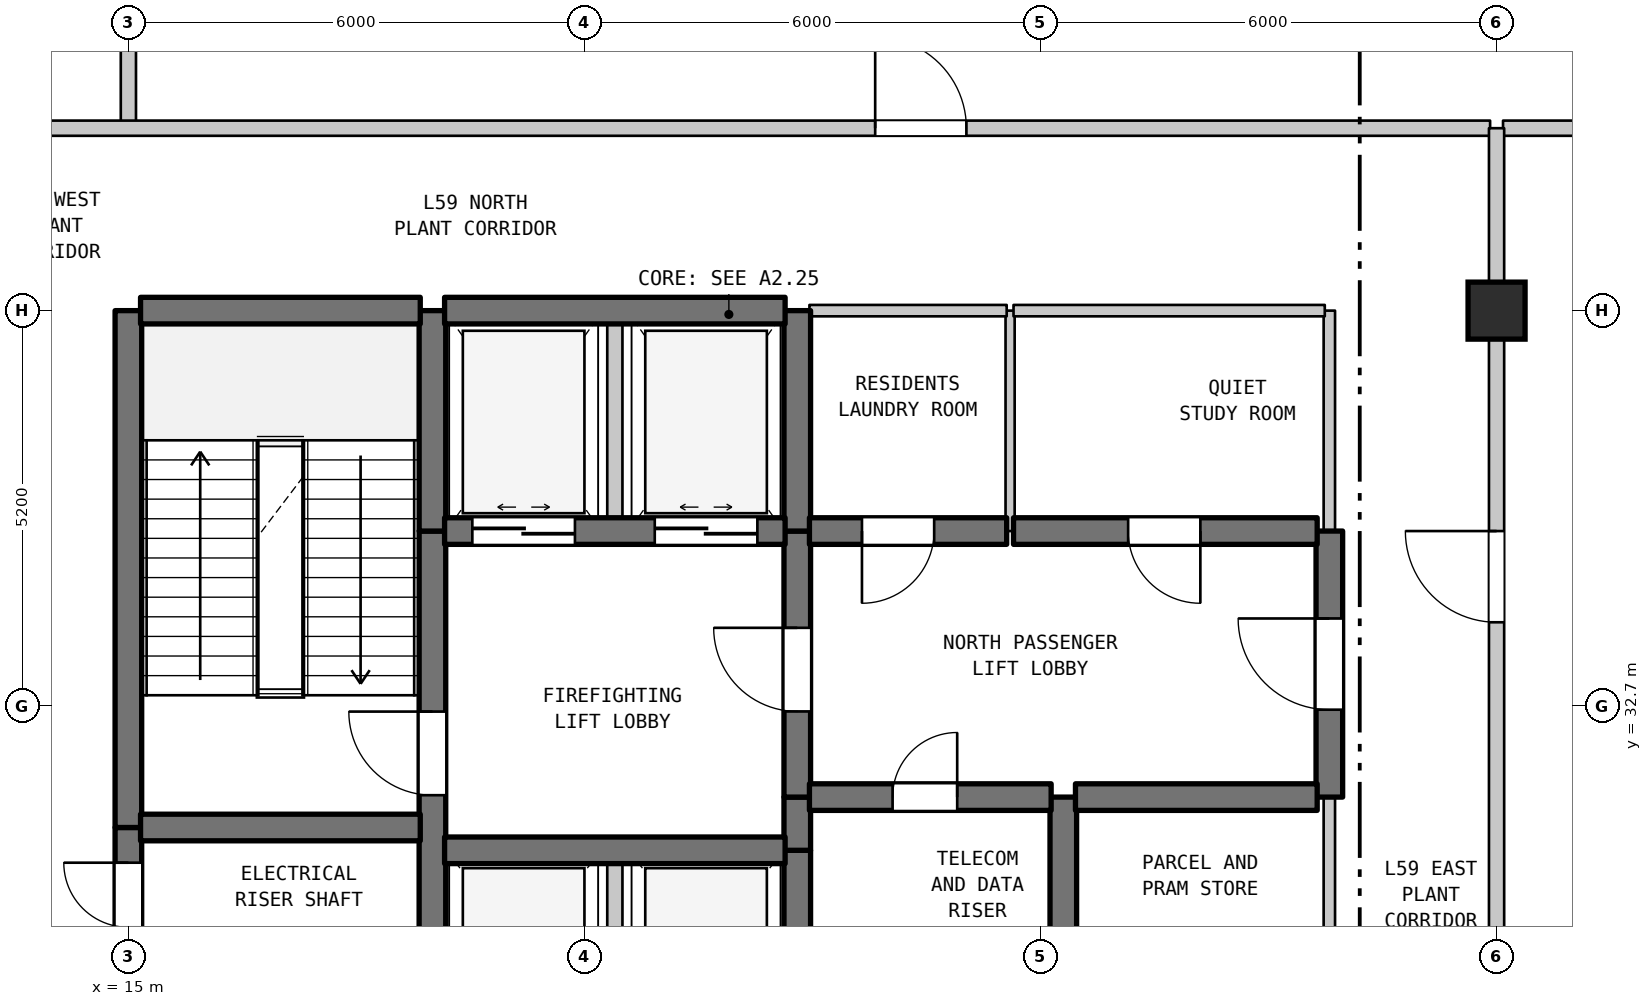
"""IFC4 building model, lengths in metres.
Left out: names, types, materials, properties, quantities, classifications, styles, units other than length and angle.
Written with IfcOpenShell. Run it as: python <this file> out.ifc"""

import sys

from ifc_helpers import new_model, si_unit, direction, frame, frame_2d, origin, origin_2d, place, context, subcontext, project, spatial, rectangle, extrude, element, fill, save


model = new_model("IFC4")
c1 = context("Model", 3, precision=1e-05, world=origin(), true_north=direction((0.0, 1.0)))
c2 = subcontext(c1, "Body", "Model", "MODEL_VIEW")
j1 = project(units=[si_unit("LENGTHUNIT", "METRE"), si_unit("PLANEANGLEUNIT", "RADIAN")], contexts=[c1])
p1 = place(None, origin())
s1 = spatial("IfcSite", under=j1, at=p1, CompositionType="ELEMENT")
p2 = place(p1, origin())
s2 = spatial("IfcBuilding", under=s1, at=p2, CompositionType="ELEMENT")
p3 = place(p2, frame((0.0, 0.0, 237.6)))
s3 = spatial("IfcBuildingStorey", under=s2, at=p3, CompositionType="ELEMENT", Elevation=237.6)
p4 = place(p3, frame((33.0, 37.9, 0.0), z_axis=(0.0, 0.0, 1.0), x_axis=(1.0, 0.0, 0.0)))
e1 = element("IfcColumn", 1, at=p4, inside=s3, PredefinedType="COLUMN", context=c2, shape_type="SweptSolid", body=[
    extrude(rectangle(XDim=0.75, YDim=0.75, at=origin_2d()), origin(), (0.0, 0.0, 1.0), 5.2),
])
p5 = place(p3, frame((3.497, 23.993, 0.0), z_axis=(0.0, 0.0, 1.0), x_axis=(0.358990281293, 0.93334129767, 0.0)))
e2 = element("IfcWall", 2, at=p5, inside=s3, PredefinedType="STANDARD", context=c2, shape_type="SweptSolid", body=[
    extrude(rectangle(XDim=30.669, YDim=0.26, at=frame_2d((15.335, 0.0))), origin(), (0.0, 0.0, 1.0), 4.88),
])
p6 = place(p3, frame((15.0, 29.5, 0.0), z_axis=(0.0, 0.0, 1.0), x_axis=(0.0, 1.0, 0.0)))
e3 = element("IfcWall", 3, at=p6, inside=s3, PredefinedType="SHEAR", context=c2, shape_type="SweptSolid", body=[
    extrude(rectangle(XDim=1.6, YDim=0.35, at=frame_2d((0.8, 0.0))), origin(), (0.0, 0.0, 1.0), 4.88),
])
p7 = place(p6, frame((0.287, 0.0, 0.0)))
e4 = element("IfcOpeningElement", 4, at=p7, cuts=e3, PredefinedType="OPENING", context=c2, shape_type="SweptSolid", body=[
    extrude(rectangle(XDim=0.85, YDim=2.1, at=frame_2d((0.425, 1.05))), frame((0.0, 0.185, 0.0), z_axis=(0.0, -1.0, 0.0), x_axis=(1.0, 0.0, 0.0)), (0.0, 0.0, 1.0), 0.37),
])
p8 = place(p3, frame((15.0, 31.1, 0.0), z_axis=(0.0, 0.0, 1.0), x_axis=(0.0, 1.0, 0.0)))
e5 = element("IfcWall", 5, at=p8, inside=s3, PredefinedType="SHEAR", context=c2, shape_type="SweptSolid", body=[
    extrude(rectangle(XDim=6.8, YDim=0.35, at=frame_2d((3.4, 0.0))), origin(), (0.0, 0.0, 1.0), 4.88),
])
p9 = place(p3, frame((15.0, 40.3, 0.0), z_axis=(0.0, 0.0, 1.0), x_axis=(0.0, 1.0, 0.0)))
e6 = element("IfcWall", 6, at=p9, inside=s3, PredefinedType="STANDARD", context=c2, shape_type="SweptSolid", body=[
    extrude(rectangle(XDim=12.933, YDim=0.2, at=frame_2d((6.466, 0.0))), origin(), (0.0, 0.0, 1.0), 4.88),
])
p10 = place(p3, frame((19.0, 29.5, 0.0), z_axis=(0.0, 0.0, 1.0), x_axis=(0.0, 1.0, 0.0)))
e7 = element("IfcWall", 7, at=p10, inside=s3, PredefinedType="SHEAR", context=c2, shape_type="SweptSolid", body=[
    extrude(rectangle(XDim=5.5, YDim=0.35, at=frame_2d((2.75, 0.0))), origin(), (0.0, 0.0, 1.0), 4.88),
])
p11 = place(p10, frame((2.025, 0.0, 0.0)))
e8 = element("IfcOpeningElement", 8, at=p11, cuts=e7, PredefinedType="OPENING", context=c2, shape_type="SweptSolid", body=[
    extrude(rectangle(XDim=1.1, YDim=2.15, at=frame_2d((0.55, 1.075))), frame((0.0, 0.185, 0.0), z_axis=(0.0, -1.0, 0.0), x_axis=(1.0, 0.0, 0.0)), (0.0, 0.0, 1.0), 0.37),
])
p12 = place(p3, frame((19.0, 35.0, 0.0), z_axis=(0.0, 0.0, 1.0), x_axis=(0.0, 1.0, 0.0)))
e9 = element("IfcWall", 9, at=p12, inside=s3, PredefinedType="SHEAR", context=c2, shape_type="SweptSolid", body=[
    extrude(rectangle(XDim=2.9, YDim=0.35, at=frame_2d((1.45, 0.0))), origin(), (0.0, 0.0, 1.0), 4.88),
])
p13 = place(p3, frame((21.4, 28.2, 0.0), z_axis=(0.0, 0.0, 1.0), x_axis=(0.0, 1.0, 0.0)))
e10 = element("IfcWall", 10, at=p13, inside=s3, PredefinedType="STANDARD", context=c2, shape_type="SweptSolid", body=[
    extrude(rectangle(XDim=2.6, YDim=0.2, at=frame_2d((1.3, 0.0))), origin(), (0.0, 0.0, 1.0), 4.88),
])
p14 = place(p3, frame((21.4, 35.0, 0.0), z_axis=(0.0, 0.0, 1.0), x_axis=(0.0, 1.0, 0.0)))
e11 = element("IfcWall", 11, at=p14, inside=s3, PredefinedType="STANDARD", context=c2, shape_type="SweptSolid", body=[
    extrude(rectangle(XDim=2.9, YDim=0.2, at=frame_2d((1.45, 0.0))), origin(), (0.0, 0.0, 1.0), 4.88),
])
p15 = place(p3, frame((23.8, 29.5, 0.0), z_axis=(0.0, 0.0, 1.0), x_axis=(0.0, 1.0, 0.0)))
e12 = element("IfcWall", 12, at=p15, inside=s3, PredefinedType="SHEAR", context=c2, shape_type="SweptSolid", body=[
    extrude(rectangle(XDim=1.3, YDim=0.35, at=frame_2d((0.65, 0.0))), origin(), (0.0, 0.0, 1.0), 4.88),
])
p16 = place(p3, frame((23.8, 30.8, 0.0), z_axis=(0.0, 0.0, 1.0), x_axis=(0.0, 1.0, 0.0)))
e13 = element("IfcWall", 13, at=p16, inside=s3, PredefinedType="SHEAR", context=c2, shape_type="SweptSolid", body=[
    extrude(rectangle(XDim=0.7, YDim=0.35, at=frame_2d((0.35, 0.0))), origin(), (0.0, 0.0, 1.0), 4.88),
])
p17 = place(p3, frame((23.8, 31.5, 0.0), z_axis=(0.0, 0.0, 1.0), x_axis=(0.0, 1.0, 0.0)))
e14 = element("IfcWall", 14, at=p17, inside=s3, PredefinedType="SHEAR", context=c2, shape_type="SweptSolid", body=[
    extrude(rectangle(XDim=3.5, YDim=0.35, at=frame_2d((1.75, 0.0))), origin(), (0.0, 0.0, 1.0), 4.88),
])
p18 = place(p17, frame((1.127, 0.0, 0.0)))
e15 = element("IfcOpeningElement", 15, at=p18, cuts=e14, PredefinedType="OPENING", context=c2, shape_type="SweptSolid", body=[
    extrude(rectangle(XDim=1.1, YDim=2.15, at=frame_2d((0.55, 1.075))), frame((0.0, 0.185, 0.0), z_axis=(0.0, -1.0, 0.0), x_axis=(1.0, 0.0, 0.0)), (0.0, 0.0, 1.0), 0.37),
])
p19 = place(p3, frame((23.8, 35.0, 0.0), z_axis=(0.0, 0.0, 1.0), x_axis=(0.0, 1.0, 0.0)))
e16 = element("IfcWall", 16, at=p19, inside=s3, PredefinedType="SHEAR", context=c2, shape_type="SweptSolid", body=[
    extrude(rectangle(XDim=2.9, YDim=0.35, at=frame_2d((1.45, 0.0))), origin(), (0.0, 0.0, 1.0), 4.88),
])
p20 = place(p3, frame((26.6, 35.0, 0.0), z_axis=(0.0, 0.0, 1.0), x_axis=(0.0, 1.0, 0.0)))
e17 = element("IfcWall", 17, at=p20, inside=s3, PredefinedType="PARTITIONING", context=c2, shape_type="SweptSolid", body=[
    extrude(rectangle(XDim=2.9, YDim=0.12, at=frame_2d((1.45, 0.0))), origin(), (0.0, 0.0, 1.0), 4.88),
])
p21 = place(p3, frame((27.3, 29.5, 0.0), z_axis=(0.0, 0.0, 1.0), x_axis=(0.0, 1.0, 0.0)))
e18 = element("IfcWall", 18, at=p21, inside=s3, PredefinedType="SHEAR", context=c2, shape_type="SweptSolid", body=[
    extrude(rectangle(XDim=2.0, YDim=0.35, at=frame_2d((1.0, 0.0))), origin(), (0.0, 0.0, 1.0), 4.88),
])
p22 = place(p3, frame((30.8, 28.9, 0.0), z_axis=(0.0, 0.0, 1.0), x_axis=(0.0, 1.0, 0.0)))
e19 = element("IfcWall", 19, at=p22, inside=s3, PredefinedType="STANDARD", context=c2, shape_type="SweptSolid", body=[
    extrude(rectangle(XDim=2.6, YDim=0.15, at=frame_2d((1.3, 0.0))), origin(), (0.0, 0.0, 1.0), 4.88),
])
p23 = place(p3, frame((30.8, 31.5, 0.0), z_axis=(0.0, 0.0, 1.0), x_axis=(0.0, 1.0, 0.0)))
e20 = element("IfcWall", 20, at=p23, inside=s3, PredefinedType="SHEAR", context=c2, shape_type="SweptSolid", body=[
    extrude(rectangle(XDim=3.5, YDim=0.35, at=frame_2d((1.75, 0.0))), origin(), (0.0, 0.0, 1.0), 4.88),
])
p24 = place(p23, frame((1.15, 0.0, 0.0)))
e21 = element("IfcOpeningElement", 21, at=p24, cuts=e20, PredefinedType="OPENING", context=c2, shape_type="SweptSolid", body=[
    extrude(rectangle(XDim=1.2, YDim=2.2, at=frame_2d((0.6, 1.1))), frame((0.0, 0.185, 0.0), z_axis=(0.0, -1.0, 0.0), x_axis=(1.0, 0.0, 0.0)), (0.0, 0.0, 1.0), 0.37),
])
p25 = place(p3, frame((30.8, 35.0, 0.0), z_axis=(0.0, 0.0, 1.0), x_axis=(0.0, 1.0, 0.0)))
e22 = element("IfcWall", 22, at=p25, inside=s3, PredefinedType="STANDARD", context=c2, shape_type="SweptSolid", body=[
    extrude(rectangle(XDim=2.9, YDim=0.15, at=frame_2d((1.45, 0.0))), origin(), (0.0, 0.0, 1.0), 4.88),
])
p26 = place(p3, frame((33.0, 28.5, 0.0), z_axis=(0.0, 0.0, 1.0), x_axis=(0.0, 1.0, 0.0)))
e23 = element("IfcWall", 23, at=p26, inside=s3, PredefinedType="STANDARD", context=c2, shape_type="SweptSolid", body=[
    extrude(rectangle(XDim=9.4, YDim=0.2, at=frame_2d((4.7, 0.0))), origin(), (0.0, 0.0, 1.0), 4.38),
])
p27 = place(p26, frame((5.3, 0.0, 0.0)))
e24 = element("IfcOpeningElement", 24, at=p27, cuts=e23, PredefinedType="OPENING", context=c2, shape_type="SweptSolid", body=[
    extrude(rectangle(XDim=1.2, YDim=2.2, at=frame_2d((0.6, 1.1))), frame((0.0, 0.11, 0.0), z_axis=(0.0, -1.0, 0.0), x_axis=(1.0, 0.0, 0.0)), (0.0, 0.0, 1.0), 0.22),
])
p28 = place(p3, frame((19.16, 30.8, 0.0), z_axis=(0.0, 0.0, 1.0), x_axis=(1.0, 0.0, 0.0)))
e25 = element("IfcWall", 25, at=p28, inside=s3, PredefinedType="SHEAR", context=c2, shape_type="SweptSolid", body=[
    extrude(rectangle(XDim=4.48, YDim=0.35, at=frame_2d((2.24, 0.0))), origin(), (0.0, 0.0, 1.0), 4.88),
])
p29 = place(p3, frame((15.16, 31.1, 0.0), z_axis=(0.0, 0.0, 1.0), x_axis=(1.0, 0.0, 0.0)))
e26 = element("IfcWall", 26, at=p29, inside=s3, PredefinedType="SHEAR", context=c2, shape_type="SweptSolid", body=[
    extrude(rectangle(XDim=3.68, YDim=0.35, at=frame_2d((1.84, 0.0))), origin(), (0.0, 0.0, 1.0), 4.88),
])
p30 = place(p3, frame((23.96, 31.5, 0.0), z_axis=(0.0, 0.0, 1.0), x_axis=(1.0, 0.0, 0.0)))
e27 = element("IfcWall", 27, at=p30, inside=s3, PredefinedType="SHEAR", context=c2, shape_type="SweptSolid", body=[
    extrude(rectangle(XDim=3.18, YDim=0.35, at=frame_2d((1.59, 0.0))), origin(), (0.0, 0.0, 1.0), 4.88),
])
p31 = place(p30, frame((1.094, 0.0, 0.0)))
e28 = element("IfcOpeningElement", 28, at=p31, cuts=e27, PredefinedType="OPENING", context=c2, shape_type="SweptSolid", body=[
    extrude(rectangle(XDim=0.85, YDim=2.1, at=frame_2d((0.425, 1.05))), frame((0.0, 0.185, 0.0), z_axis=(0.0, -1.0, 0.0), x_axis=(1.0, 0.0, 0.0)), (0.0, 0.0, 1.0), 0.37),
])
p32 = place(p3, frame((27.46, 31.5, 0.0), z_axis=(0.0, 0.0, 1.0), x_axis=(1.0, 0.0, 0.0)))
e29 = element("IfcWall", 29, at=p32, inside=s3, PredefinedType="SHEAR", context=c2, shape_type="SweptSolid", body=[
    extrude(rectangle(XDim=3.18, YDim=0.35, at=frame_2d((1.59, 0.0))), origin(), (0.0, 0.0, 1.0), 4.88),
])
p33 = place(p3, frame((19.16, 35.0, 0.0), z_axis=(0.0, 0.0, 1.0), x_axis=(1.0, 0.0, 0.0)))
e30 = element("IfcWall", 30, at=p33, inside=s3, PredefinedType="SHEAR", context=c2, shape_type="SweptSolid", body=[
    extrude(rectangle(XDim=4.48, YDim=0.35, at=frame_2d((2.24, 0.0))), origin(), (0.0, 0.0, 1.0), 4.88),
])
p34 = place(p33, frame((0.365, 0.0, 0.0)))
e31 = element("IfcOpeningElement", 31, at=p34, cuts=e30, PredefinedType="OPENING", context=c2, shape_type="SweptSolid", body=[
    extrude(rectangle(XDim=1.35, YDim=2.2, at=frame_2d((0.675, 1.1))), frame((0.0, 0.185, 0.0), z_axis=(0.0, -1.0, 0.0), x_axis=(1.0, 0.0, 0.0)), (0.0, 0.0, 1.0), 0.37),
])
p35 = place(p33, frame((2.765, 0.0, 0.0)))
e32 = element("IfcOpeningElement", 32, at=p35, cuts=e30, PredefinedType="OPENING", context=c2, shape_type="SweptSolid", body=[
    extrude(rectangle(XDim=1.35, YDim=2.2, at=frame_2d((0.675, 1.1))), frame((0.0, 0.185, 0.0), z_axis=(0.0, -1.0, 0.0), x_axis=(1.0, 0.0, 0.0)), (0.0, 0.0, 1.0), 0.37),
])
p36 = place(p3, frame((23.96, 35.0, 0.0), z_axis=(0.0, 0.0, 1.0), x_axis=(1.0, 0.0, 0.0)))
e33 = element("IfcWall", 33, at=p36, inside=s3, PredefinedType="SHEAR", context=c2, shape_type="SweptSolid", body=[
    extrude(rectangle(XDim=2.595, YDim=0.35, at=frame_2d((1.297, 0.0))), origin(), (0.0, 0.0, 1.0), 4.88),
])
p37 = place(p36, frame((0.691, 0.0, 0.0)))
e34 = element("IfcOpeningElement", 34, at=p37, cuts=e33, PredefinedType="OPENING", context=c2, shape_type="SweptSolid", body=[
    extrude(rectangle(XDim=0.95, YDim=2.15, at=frame_2d((0.475, 1.075))), frame((0.0, 0.185, 0.0), z_axis=(0.0, -1.0, 0.0), x_axis=(1.0, 0.0, 0.0)), (0.0, 0.0, 1.0), 0.37),
])
p38 = place(p3, frame((26.645, 35.0, 0.0), z_axis=(0.0, 0.0, 1.0), x_axis=(1.0, 0.0, 0.0)))
e35 = element("IfcWall", 35, at=p38, inside=s3, PredefinedType="SHEAR", context=c2, shape_type="SweptSolid", body=[
    extrude(rectangle(XDim=3.995, YDim=0.35, at=frame_2d((1.998, 0.0))), origin(), (0.0, 0.0, 1.0), 4.88),
])
p39 = place(p38, frame((1.508, 0.0, 0.0)))
e36 = element("IfcOpeningElement", 36, at=p39, cuts=e35, PredefinedType="OPENING", context=c2, shape_type="SweptSolid", body=[
    extrude(rectangle(XDim=0.95, YDim=2.15, at=frame_2d((0.475, 1.075))), frame((0.0, 0.185, 0.0), z_axis=(0.0, -1.0, 0.0), x_axis=(1.0, 0.0, 0.0)), (0.0, 0.0, 1.0), 0.37),
])
p40 = place(p3, frame((15.16, 37.9, 0.0), z_axis=(0.0, 0.0, 1.0), x_axis=(1.0, 0.0, 0.0)))
e37 = element("IfcWall", 37, at=p40, inside=s3, PredefinedType="SHEAR", context=c2, shape_type="SweptSolid", body=[
    extrude(rectangle(XDim=3.68, YDim=0.35, at=frame_2d((1.84, 0.0))), origin(), (0.0, 0.0, 1.0), 4.88),
])
p41 = place(p3, frame((19.16, 37.9, 0.0), z_axis=(0.0, 0.0, 1.0), x_axis=(1.0, 0.0, 0.0)))
e38 = element("IfcWall", 38, at=p41, inside=s3, PredefinedType="SHEAR", context=c2, shape_type="SweptSolid", body=[
    extrude(rectangle(XDim=4.48, YDim=0.35, at=frame_2d((2.24, 0.0))), origin(), (0.0, 0.0, 1.0), 4.88),
])
p42 = place(p3, frame((23.96, 37.9, 0.0), z_axis=(0.0, 0.0, 1.0), x_axis=(1.0, 0.0, 0.0)))
e39 = element("IfcWall", 39, at=p42, inside=s3, PredefinedType="STANDARD", context=c2, shape_type="SweptSolid", body=[
    extrude(rectangle(XDim=2.595, YDim=0.15, at=frame_2d((1.297, 0.0))), origin(), (0.0, 0.0, 1.0), 4.38),
])
p43 = place(p3, frame((26.645, 37.9, 0.0), z_axis=(0.0, 0.0, 1.0), x_axis=(1.0, 0.0, 0.0)))
e40 = element("IfcWall", 40, at=p43, inside=s3, PredefinedType="STANDARD", context=c2, shape_type="SweptSolid", body=[
    extrude(rectangle(XDim=4.095, YDim=0.15, at=frame_2d((2.047, 0.0))), origin(), (0.0, 0.0, 1.0), 4.38),
])
p44 = place(p3, frame((12.685, 40.3, 0.0), z_axis=(0.0, 0.0, 1.0), x_axis=(1.0, 0.0, 0.0)))
e41 = element("IfcWall", 41, at=p44, inside=s3, PredefinedType="STANDARD", context=c2, shape_type="SweptSolid", body=[
    extrude(rectangle(XDim=20.23, YDim=0.2, at=frame_2d((10.115, 0.0))), origin(), (0.0, 0.0, 1.0), 4.88),
])
p45 = place(p44, frame((12.14, 0.0, 0.0)))
e42 = element("IfcOpeningElement", 42, at=p45, cuts=e41, PredefinedType="OPENING", context=c2, shape_type="SweptSolid", body=[
    extrude(rectangle(XDim=1.2, YDim=2.2, at=frame_2d((0.6, 1.1))), frame((0.0, 0.11, 0.0), z_axis=(0.0, -1.0, 0.0), x_axis=(1.0, 0.0, 0.0)), (0.0, 0.0, 1.0), 0.22),
])
p46 = place(p3, frame((33.085, 40.3, 0.0), z_axis=(0.0, 0.0, 1.0), x_axis=(1.0, 0.0, 0.0)))
e43 = element("IfcWall", 43, at=p46, inside=s3, PredefinedType="STANDARD", context=c2, shape_type="SweptSolid", body=[
    extrude(rectangle(XDim=9.044, YDim=0.2, at=frame_2d((4.522, 0.0))), origin(), (0.0, 0.0, 1.0), 4.88),
])
p47 = place(p3, frame((33.0, 37.9, 0.0), z_axis=(0.0, 0.0, 1.0), x_axis=(0.0, 1.0, 0.0)))
e44 = element("IfcWall", 44, at=p47, inside=s3, PredefinedType="STANDARD", context=c2, shape_type="SweptSolid", body=[
    extrude(rectangle(XDim=2.4, YDim=0.2, at=frame_2d((1.2, 0.0))), origin(), (0.0, 0.0, 1.0), 4.28),
])
p48 = place(p7, origin())
e45 = element("IfcDoor", 45, at=p48, inside=s3, OperationType="SINGLE_SWING_RIGHT", PredefinedType="DOOR", context=c2, shape_type="SweptSolid", body=[
    extrude(rectangle(XDim=0.85, YDim=2.1, at=frame_2d((0.425, 1.05))), frame((0.0, 0.025, 0.0), z_axis=(0.0, -1.0, 0.0), x_axis=(1.0, 0.0, 0.0)), (0.0, 0.0, 1.0), 0.05),
])
fill(e4, e45)
p49 = place(p11, origin())
e46 = element("IfcDoor", 46, at=p49, inside=s3, OperationType="SINGLE_SWING_RIGHT", PredefinedType="DOOR", context=c2, shape_type="SweptSolid", body=[
    extrude(rectangle(XDim=1.1, YDim=2.15, at=frame_2d((0.55, 1.075))), frame((0.0, 0.025, 0.0), z_axis=(0.0, -1.0, 0.0), x_axis=(1.0, 0.0, 0.0)), (0.0, 0.0, 1.0), 0.05),
])
fill(e8, e46)
p50 = place(p18, origin())
e47 = element("IfcDoor", 47, at=p50, inside=s3, OperationType="SINGLE_SWING_RIGHT", PredefinedType="DOOR", context=c2, shape_type="SweptSolid", body=[
    extrude(rectangle(XDim=1.1, YDim=2.15, at=frame_2d((0.55, 1.075))), frame((0.0, 0.025, 0.0), z_axis=(0.0, -1.0, 0.0), x_axis=(1.0, 0.0, 0.0)), (0.0, 0.0, 1.0), 0.05),
])
fill(e15, e47)
p51 = place(p24, origin())
e48 = element("IfcDoor", 48, at=p51, inside=s3, OperationType="SINGLE_SWING_RIGHT", PredefinedType="DOOR", context=c2, shape_type="SweptSolid", body=[
    extrude(rectangle(XDim=1.2, YDim=2.2, at=frame_2d((0.6, 1.1))), frame((0.0, 0.025, 0.0), z_axis=(0.0, -1.0, 0.0), x_axis=(1.0, 0.0, 0.0)), (0.0, 0.0, 1.0), 0.05),
])
fill(e21, e48)
p52 = place(p27, origin())
e49 = element("IfcDoor", 49, at=p52, inside=s3, OperationType="SINGLE_SWING_RIGHT", PredefinedType="DOOR", context=c2, shape_type="SweptSolid", body=[
    extrude(rectangle(XDim=1.2, YDim=2.2, at=frame_2d((0.6, 1.1))), frame((0.0, 0.025, 0.0), z_axis=(0.0, -1.0, 0.0), x_axis=(1.0, 0.0, 0.0)), (0.0, 0.0, 1.0), 0.05),
])
fill(e24, e49)
p53 = place(p31, origin())
e50 = element("IfcDoor", 50, at=p53, inside=s3, OperationType="SINGLE_SWING_RIGHT", PredefinedType="DOOR", context=c2, shape_type="SweptSolid", body=[
    extrude(rectangle(XDim=0.85, YDim=2.1, at=frame_2d((0.425, 1.05))), frame((0.0, 0.025, 0.0), z_axis=(0.0, -1.0, 0.0), x_axis=(1.0, 0.0, 0.0)), (0.0, 0.0, 1.0), 0.05),
])
fill(e28, e50)
p54 = place(p34, origin())
e51 = element("IfcDoor", 51, at=p54, inside=s3, OperationType="DOUBLE_DOOR_SLIDING", PredefinedType="DOOR", context=c2, shape_type="SweptSolid", body=[
    extrude(rectangle(XDim=1.35, YDim=2.2, at=frame_2d((0.675, 1.1))), frame((0.0, 0.025, 0.0), z_axis=(0.0, -1.0, 0.0), x_axis=(1.0, 0.0, 0.0)), (0.0, 0.0, 1.0), 0.05),
])
fill(e31, e51)
p55 = place(p35, origin())
e52 = element("IfcDoor", 52, at=p55, inside=s3, OperationType="DOUBLE_DOOR_SLIDING", PredefinedType="DOOR", context=c2, shape_type="SweptSolid", body=[
    extrude(rectangle(XDim=1.35, YDim=2.2, at=frame_2d((0.675, 1.1))), frame((0.0, 0.025, 0.0), z_axis=(0.0, -1.0, 0.0), x_axis=(1.0, 0.0, 0.0)), (0.0, 0.0, 1.0), 0.05),
])
fill(e32, e52)
p56 = place(p37, frame((0.95, 0.0, 0.0), z_axis=(0.0, 0.0, 1.0), x_axis=(-1.0, 0.0, 0.0)))
e53 = element("IfcDoor", 53, at=p56, inside=s3, OperationType="SINGLE_SWING_LEFT", PredefinedType="DOOR", context=c2, shape_type="SweptSolid", body=[
    extrude(rectangle(XDim=0.95, YDim=2.15, at=frame_2d((0.475, 1.075))), frame((0.0, 0.025, 0.0), z_axis=(0.0, -1.0, 0.0), x_axis=(1.0, 0.0, 0.0)), (0.0, 0.0, 1.0), 0.05),
])
fill(e34, e53)
p57 = place(p39, frame((0.95, 0.0, 0.0), z_axis=(0.0, 0.0, 1.0), x_axis=(-1.0, 0.0, 0.0)))
e54 = element("IfcDoor", 54, at=p57, inside=s3, OperationType="SINGLE_SWING_RIGHT", PredefinedType="DOOR", context=c2, shape_type="SweptSolid", body=[
    extrude(rectangle(XDim=0.95, YDim=2.15, at=frame_2d((0.475, 1.075))), frame((0.0, 0.025, 0.0), z_axis=(0.0, -1.0, 0.0), x_axis=(1.0, 0.0, 0.0)), (0.0, 0.0, 1.0), 0.05),
])
fill(e36, e54)
p58 = place(p45, origin())
e55 = element("IfcDoor", 55, at=p58, inside=s3, OperationType="SINGLE_SWING_LEFT", PredefinedType="DOOR", context=c2, shape_type="SweptSolid", body=[
    extrude(rectangle(XDim=1.2, YDim=2.2, at=frame_2d((0.6, 1.1))), frame((0.0, 0.025, 0.0), z_axis=(0.0, -1.0, 0.0), x_axis=(1.0, 0.0, 0.0)), (0.0, 0.0, 1.0), 0.05),
])
fill(e42, e55)
save(model, sys.argv[1])
